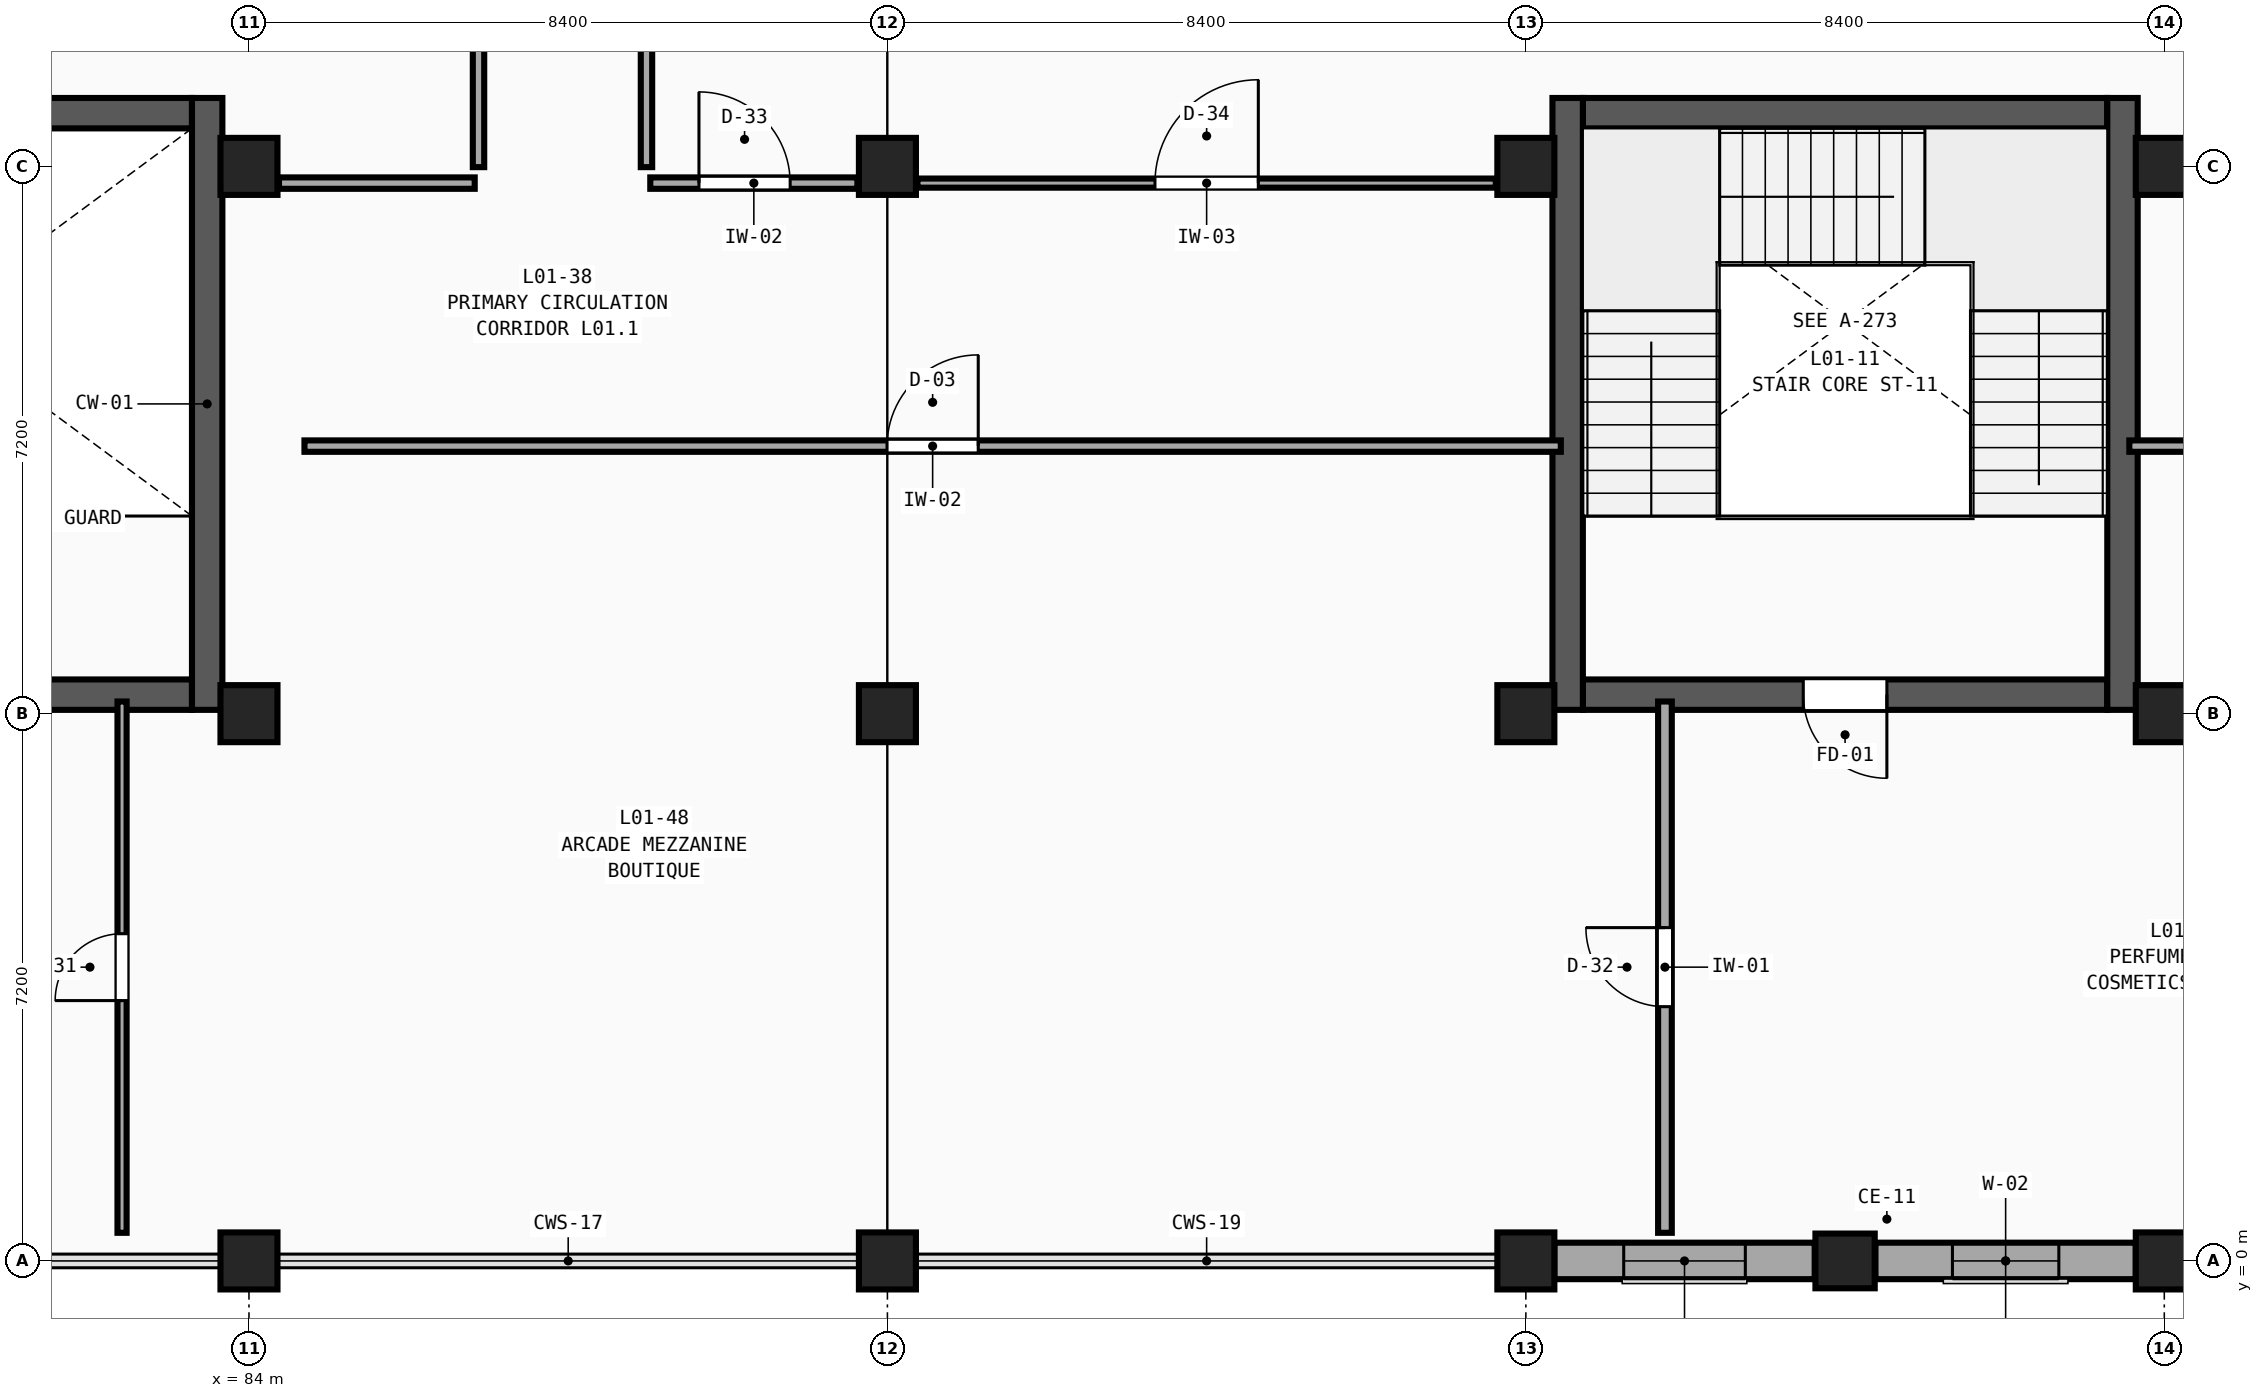
"""IFC4 building model, lengths in metres.
Left out: names, types, materials, properties, quantities, classifications, styles, units other than length and angle.
Written with IfcOpenShell. Run it as: python <this file> out.ifc"""

import sys

from ifc_helpers import new_model, si_unit, direction, frame, frame_2d, origin, origin_2d, place, context, subcontext, project, spatial, rectangle, extrude, element, fill, save


model = new_model("IFC4")
c1 = context("Model", 3, precision=1e-05, world=origin(), true_north=direction((0.0, 1.0)))
c2 = subcontext(c1, "Body", "Model", "MODEL_VIEW")
j1 = project(units=[si_unit("LENGTHUNIT", "METRE"), si_unit("PLANEANGLEUNIT", "RADIAN")], contexts=[c1])
p1 = place(None, origin())
s1 = spatial("IfcSite", under=j1, at=p1, CompositionType="ELEMENT")
p2 = place(p1, origin())
s2 = spatial("IfcBuilding", under=s1, at=p2, CompositionType="ELEMENT")
p3 = place(p2, frame((0.0, 0.0, 5.4)))
s3 = spatial("IfcBuildingStorey", under=s2, at=p3, CompositionType="ELEMENT", Elevation=5.4)
for number, where, z_axis, x_axis in (
    (1, (84.0, 0.0, 0.0), (0.0, 0.0, 1.0), (1.0, 0.0, 0.0)),
    (2, (84.0, 7.2, 0.0), (0.0, 0.0, 1.0), (1.0, 0.0, 0.0)),
    (3, (84.0, 14.4, 0.0), (0.0, 0.0, 1.0), (1.0, 0.0, 0.0)),
    (4, (92.4, 0.0, 0.0), (0.0, 0.0, 1.0), (1.0, 0.0, 0.0)),
    (5, (92.4, 7.2, 0.0), (0.0, 0.0, 1.0), (1.0, 0.0, 0.0)),
    (6, (92.4, 14.4, 0.0), (0.0, 0.0, 1.0), (1.0, 0.0, 0.0)),
    (7, (100.8, 0.0, 0.0), (0.0, 0.0, 1.0), (1.0, 0.0, 0.0)),
    (8, (100.8, 7.2, 0.0), (0.0, 0.0, 1.0), (1.0, 0.0, 0.0)),
    (9, (100.8, 14.4, 0.0), (0.0, 0.0, 1.0), (1.0, 0.0, 0.0)),
    (10, (109.2, 0.0, 0.0), (0.0, 0.0, 1.0), (1.0, 0.0, 0.0)),
    (11, (109.2, 7.2, 0.0), (0.0, 0.0, 1.0), (1.0, 0.0, 0.0)),
    (12, (109.2, 14.4, 0.0), (0.0, 0.0, 1.0), (1.0, 0.0, 0.0)),
):
    element("IfcColumn", number, at=place(p3, frame(where, z_axis=z_axis, x_axis=x_axis)), inside=s3, PredefinedType="COLUMN", context=c2, shape_type="SweptSolid", body=[
        extrude(rectangle(XDim=0.75, YDim=0.75, at=origin_2d()), origin(), (0.0, 0.0, 1.0), 4.5),
    ])
p4 = place(p3, frame((105.0, 0.0, 0.0), z_axis=(0.0, 0.0, 1.0), x_axis=(1.0, 0.0, 0.0)))
e13 = element("IfcColumn", 13, at=p4, inside=s3, PredefinedType="PILASTER", context=c2, shape_type="SweptSolid", body=[
    extrude(rectangle(XDim=0.78, YDim=0.72, at=origin_2d()), origin(), (0.0, 0.0, 1.0), 4.5),
])
p5 = place(p3, frame((108.825, 0.0, 0.0), z_axis=(0.0, 0.0, 1.0), x_axis=(-1.0, 0.0, 0.0)))
e14 = element("IfcWall", 14, at=p5, inside=s3, PredefinedType="SOLIDWALL", context=c2, shape_type="SweptSolid", body=[
    extrude(rectangle(XDim=3.425, YDim=0.48, at=frame_2d((1.712, 0.0))), origin(), (0.0, 0.0, 1.0), 3.63),
])
p6 = place(p5, frame((1.012, 0.0, 0.75)))
e15 = element("IfcOpeningElement", 15, at=p6, cuts=e14, PredefinedType="OPENING", context=c2, shape_type="SweptSolid", body=[
    extrude(rectangle(XDim=1.4, YDim=1.9, at=frame_2d((0.7, 0.95))), frame((0.0, 0.26, 0.0), z_axis=(0.0, -1.0, 0.0), x_axis=(1.0, 0.0, 0.0)), (0.0, 0.0, 1.0), 0.52),
])
p7 = place(p3, frame((104.6, 0.0, 0.0), z_axis=(0.0, 0.0, 1.0), x_axis=(-1.0, 0.0, 0.0)))
e16 = element("IfcWall", 16, at=p7, inside=s3, PredefinedType="SOLIDWALL", context=c2, shape_type="SweptSolid", body=[
    extrude(rectangle(XDim=3.425, YDim=0.48, at=frame_2d((1.712, 0.0))), origin(), (0.0, 0.0, 1.0), 3.63),
])
p8 = place(p7, frame((0.913, 0.0, 0.75)))
e17 = element("IfcOpeningElement", 17, at=p8, cuts=e16, PredefinedType="OPENING", context=c2, shape_type="SweptSolid", body=[
    extrude(rectangle(XDim=1.6, YDim=1.9, at=frame_2d((0.8, 0.95))), frame((0.0, 0.26, 0.0), z_axis=(0.0, -1.0, 0.0), x_axis=(1.0, 0.0, 0.0)), (0.0, 0.0, 1.0), 0.52),
])
p9 = place(p3, frame((83.25, 7.45, 0.0), z_axis=(0.0, 0.0, 1.0), x_axis=(-1.0, 0.0, 0.0)))
e18 = element("IfcWall", 18, at=p9, inside=s3, PredefinedType="SHEAR", context=c2, shape_type="SweptSolid", body=[
    extrude(rectangle(XDim=6.9, YDim=0.4, at=frame_2d((3.45, 0.0))), origin(), (0.0, 0.0, 1.0), 4.5),
])
p10 = place(p9, frame((2.9, 0.0, 0.0)))
e19 = element("IfcOpeningElement", 19, at=p10, cuts=e18, PredefinedType="OPENING", context=c2, shape_type="SweptSolid", body=[
    extrude(rectangle(XDim=1.1, YDim=2.2, at=frame_2d((0.55, 1.1))), frame((0.0, 0.22, 0.0), z_axis=(0.0, -1.0, 0.0), x_axis=(1.0, 0.0, 0.0)), (0.0, 0.0, 1.0), 0.44),
])
p11 = place(p3, frame((76.35, 15.1, 0.0), z_axis=(0.0, 0.0, 1.0), x_axis=(1.0, 0.0, 0.0)))
e20 = element("IfcWall", 20, at=p11, inside=s3, PredefinedType="SHEAR", context=c2, shape_type="SweptSolid", body=[
    extrude(rectangle(XDim=6.9, YDim=0.4, at=frame_2d((3.45, 0.0))), origin(), (0.0, 0.0, 1.0), 4.5),
])
p12 = place(p3, frame((83.45, 7.25, 0.0), z_axis=(0.0, 0.0, 1.0), x_axis=(0.0, 1.0, 0.0)))
e21 = element("IfcWall", 21, at=p12, inside=s3, PredefinedType="SHEAR", context=c2, shape_type="SweptSolid", body=[
    extrude(rectangle(XDim=8.05, YDim=0.4, at=frame_2d((4.025, 0.0))), origin(), (0.0, 0.0, 1.0), 4.5),
])
p13 = place(p3, frame((108.45, 7.45, 0.0), z_axis=(0.0, 0.0, 1.0), x_axis=(-1.0, 0.0, 0.0)))
e22 = element("IfcWall", 22, at=p13, inside=s3, PredefinedType="SHEAR", context=c2, shape_type="SweptSolid", body=[
    extrude(rectangle(XDim=6.9, YDim=0.4, at=frame_2d((3.45, 0.0))), origin(), (0.0, 0.0, 1.0), 4.5),
])
p14 = place(p13, frame((2.9, 0.0, 0.0)))
e23 = element("IfcOpeningElement", 23, at=p14, cuts=e22, PredefinedType="OPENING", context=c2, shape_type="SweptSolid", body=[
    extrude(rectangle(XDim=1.1, YDim=2.2, at=frame_2d((0.55, 1.1))), frame((0.0, 0.22, 0.0), z_axis=(0.0, -1.0, 0.0), x_axis=(1.0, 0.0, 0.0)), (0.0, 0.0, 1.0), 0.44),
])
p15 = place(p3, frame((101.55, 15.1, 0.0), z_axis=(0.0, 0.0, 1.0), x_axis=(1.0, 0.0, 0.0)))
e24 = element("IfcWall", 24, at=p15, inside=s3, PredefinedType="SHEAR", context=c2, shape_type="SweptSolid", body=[
    extrude(rectangle(XDim=6.9, YDim=0.4, at=frame_2d((3.45, 0.0))), origin(), (0.0, 0.0, 1.0), 4.5),
])
for number, where, z_axis, x_axis in (
    (25, (101.35, 15.3, 0.0), (0.0, 0.0, 1.0), (0.0, -1.0, 0.0)),
    (26, (108.65, 7.25, 0.0), (0.0, 0.0, 1.0), (0.0, 1.0, 0.0)),
):
    element("IfcWall", number, at=place(p3, frame(where, z_axis=z_axis, x_axis=x_axis)), inside=s3, PredefinedType="SHEAR", context=c2, shape_type="SweptSolid", body=[
        extrude(rectangle(XDim=8.05, YDim=0.4, at=frame_2d((4.025, 0.0))), origin(), (0.0, 0.0, 1.0), 4.5),
    ])
p16 = place(p3, frame((108.74, 10.72, 0.0), z_axis=(0.0, 0.0, 1.0), x_axis=(1.0, 0.0, 0.0)))
e27 = element("IfcWall", 27, at=p16, inside=s3, PredefinedType="PARTITIONING", context=c2, shape_type="SweptSolid", body=[
    extrude(rectangle(XDim=17.52, YDim=0.15, at=frame_2d((8.76, 0.0))), origin(), (0.0, 0.0, 1.0), 4.18),
])
p17 = place(p16, frame((8.16, 0.0, 0.0)))
e28 = element("IfcOpeningElement", 28, at=p17, cuts=e27, PredefinedType="OPENING", context=c2, shape_type="SweptSolid", body=[
    extrude(rectangle(XDim=1.2, YDim=2.45, at=frame_2d((0.6, 1.225))), frame((0.0, 0.095, 0.0), z_axis=(0.0, -1.0, 0.0), x_axis=(1.0, 0.0, 0.0)), (0.0, 0.0, 1.0), 0.19),
])
p18 = place(p3, frame((84.73, 10.72, 0.0), z_axis=(0.0, 0.0, 1.0), x_axis=(1.0, 0.0, 0.0)))
e29 = element("IfcWall", 29, at=p18, inside=s3, PredefinedType="PARTITIONING", context=c2, shape_type="SweptSolid", body=[
    extrude(rectangle(XDim=16.53, YDim=0.15, at=frame_2d((8.265, 0.0))), origin(), (0.0, 0.0, 1.0), 4.18),
])
p19 = place(p18, frame((7.665, 0.0, 0.0)))
e30 = element("IfcOpeningElement", 30, at=p19, cuts=e29, PredefinedType="OPENING", context=c2, shape_type="SweptSolid", body=[
    extrude(rectangle(XDim=1.2, YDim=2.05, at=frame_2d((0.6, 1.025))), frame((0.0, 0.095, 0.0), z_axis=(0.0, -1.0, 0.0), x_axis=(1.0, 0.0, 0.0)), (0.0, 0.0, 1.0), 0.19),
])
p20 = place(p3, frame((89.28, 14.18, 0.0), z_axis=(0.0, 0.0, 1.0), x_axis=(1.0, 0.0, 0.0)))
e31 = element("IfcWall", 31, at=p20, inside=s3, PredefinedType="PARTITIONING", context=c2, shape_type="SweptSolid", body=[
    extrude(rectangle(XDim=2.725, YDim=0.15, at=frame_2d((1.362, 0.0))), origin(), (0.0, 0.0, 1.0), 3.73),
])
p21 = place(p20, frame((0.64, 0.0, 0.0)))
e32 = element("IfcOpeningElement", 32, at=p21, cuts=e31, PredefinedType="OPENING", context=c2, shape_type="SweptSolid", body=[
    extrude(rectangle(XDim=1.2, YDim=2.45, at=frame_2d((0.6, 1.225))), frame((0.0, 0.095, 0.0), z_axis=(0.0, -1.0, 0.0), x_axis=(1.0, 0.0, 0.0)), (0.0, 0.0, 1.0), 0.19),
])
p22 = place(p3, frame((92.795, 14.18, 0.0), z_axis=(0.0, 0.0, 1.0), x_axis=(1.0, 0.0, 0.0)))
e33 = element("IfcWall", 33, at=p22, inside=s3, PredefinedType="PARTITIONING", context=c2, shape_type="SweptSolid", body=[
    extrude(rectangle(XDim=7.61, YDim=0.12, at=frame_2d((3.805, 0.0))), origin(), (0.0, 0.0, 1.0), 3.73),
])
p23 = place(p22, frame((3.125, 0.0, 0.0)))
e34 = element("IfcOpeningElement", 34, at=p23, cuts=e33, PredefinedType="OPENING", context=c2, shape_type="SweptSolid", body=[
    extrude(rectangle(XDim=1.36, YDim=2.45, at=frame_2d((0.68, 1.225))), frame((0.0, 0.08, 0.0), z_axis=(0.0, -1.0, 0.0), x_axis=(1.0, 0.0, 0.0)), (0.0, 0.0, 1.0), 0.16),
])
p24 = place(p3, frame((87.02, 14.39, 0.0), z_axis=(0.0, 0.0, 1.0), x_axis=(0.0, 1.0, 0.0)))
e35 = element("IfcWall", 35, at=p24, inside=s3, PredefinedType="PARTITIONING", context=c2, shape_type="SweptSolid", body=[
    extrude(rectangle(XDim=10.47, YDim=0.15, at=frame_2d((5.235, 0.0))), origin(), (0.0, 0.0, 1.0), 4.18),
])
p25 = place(p24, frame((4.635, 0.0, 0.0)))
e36 = element("IfcOpeningElement", 36, at=p25, cuts=e35, PredefinedType="OPENING", context=c2, shape_type="SweptSolid", body=[
    extrude(rectangle(XDim=1.2, YDim=2.21, at=frame_2d((0.6, 1.105))), frame((0.0, 0.095, 0.0), z_axis=(0.0, -1.0, 0.0), x_axis=(1.0, 0.0, 0.0)), (0.0, 0.0, 1.0), 0.19),
])
p26 = place(p3, frame((89.23, 14.39, 0.0), z_axis=(0.0, 0.0, 1.0), x_axis=(0.0, 1.0, 0.0)))
e37 = element("IfcWall", 37, at=p26, inside=s3, PredefinedType="PARTITIONING", context=c2, shape_type="SweptSolid", body=[
    extrude(rectangle(XDim=10.47, YDim=0.15, at=frame_2d((5.235, 0.0))), origin(), (0.0, 0.0, 1.0), 4.18),
])
p27 = place(p26, frame((4.395, 0.0, 0.0)))
e38 = element("IfcOpeningElement", 38, at=p27, cuts=e37, PredefinedType="OPENING", context=c2, shape_type="SweptSolid", body=[
    extrude(rectangle(XDim=1.68, YDim=2.21, at=frame_2d((0.84, 1.105))), frame((0.0, 0.095, 0.0), z_axis=(0.0, -1.0, 0.0), x_axis=(1.0, 0.0, 0.0)), (0.0, 0.0, 1.0), 0.19),
])
p28 = place(p3, frame((82.33, 0.37, 0.0), z_axis=(0.0, 0.0, 1.0), x_axis=(0.0, 1.0, 0.0)))
e39 = element("IfcWall", 39, at=p28, inside=s3, PredefinedType="PARTITIONING", context=c2, shape_type="SweptSolid", body=[
    extrude(rectangle(XDim=6.99, YDim=0.12, at=frame_2d((3.495, 0.0))), origin(), (0.0, 0.0, 1.0), 4.18),
])
p29 = place(p28, frame((3.055, 0.0, 0.0)))
e40 = element("IfcOpeningElement", 40, at=p29, cuts=e39, PredefinedType="OPENING", context=c2, shape_type="SweptSolid", body=[
    extrude(rectangle(XDim=0.88, YDim=2.45, at=frame_2d((0.44, 1.225))), frame((0.0, 0.08, 0.0), z_axis=(0.0, -1.0, 0.0), x_axis=(1.0, 0.0, 0.0)), (0.0, 0.0, 1.0), 0.16),
])
p30 = place(p3, frame((102.63, 0.37, 0.0), z_axis=(0.0, 0.0, 1.0), x_axis=(0.0, 1.0, 0.0)))
e41 = element("IfcWall", 41, at=p30, inside=s3, PredefinedType="PARTITIONING", context=c2, shape_type="SweptSolid", body=[
    extrude(rectangle(XDim=6.99, YDim=0.18, at=frame_2d((3.495, 0.0))), origin(), (0.0, 0.0, 1.0), 4.18),
])
p31 = place(p30, frame((2.975, 0.0, 0.0)))
e42 = element("IfcOpeningElement", 42, at=p31, cuts=e41, PredefinedType="OPENING", context=c2, shape_type="SweptSolid", body=[
    extrude(rectangle(XDim=1.04, YDim=2.45, at=frame_2d((0.52, 1.225))), frame((0.0, 0.11, 0.0), z_axis=(0.0, -1.0, 0.0), x_axis=(1.0, 0.0, 0.0)), (0.0, 0.0, 1.0), 0.22),
])
p32 = place(p3, frame((84.395, 14.18, 0.0), z_axis=(0.0, 0.0, 1.0), x_axis=(1.0, 0.0, 0.0)))
e43 = element("IfcWall", 43, at=p32, inside=s3, PredefinedType="PARTITIONING", context=c2, shape_type="SweptSolid", body=[
    extrude(rectangle(XDim=2.575, YDim=0.15, at=frame_2d((1.288, 0.0))), origin(), (0.0, 0.0, 1.0), 3.73),
])
p33 = place(p6, origin())
e44 = element("IfcWindow", 44, at=p33, inside=s3, PartitioningType="DOUBLE_PANEL_VERTICAL", PredefinedType="WINDOW", context=c2, shape_type="SweptSolid", body=[
    extrude(rectangle(XDim=1.4, YDim=1.9, at=frame_2d((0.7, 0.95))), frame((0.0, 0.03, 0.0), z_axis=(0.0, -1.0, 0.0), x_axis=(1.0, 0.0, 0.0)), (0.0, 0.0, 1.0), 0.06),
])
fill(e15, e44)
p34 = place(p8, origin())
e45 = element("IfcWindow", 45, at=p34, inside=s3, PartitioningType="DOUBLE_PANEL_VERTICAL", PredefinedType="WINDOW", context=c2, shape_type="SweptSolid", body=[
    extrude(rectangle(XDim=1.6, YDim=1.9, at=frame_2d((0.8, 0.95))), frame((0.0, 0.03, 0.0), z_axis=(0.0, -1.0, 0.0), x_axis=(1.0, 0.0, 0.0)), (0.0, 0.0, 1.0), 0.06),
])
fill(e17, e45)
p35 = place(p14, origin())
e46 = element("IfcDoor", 46, at=p35, inside=s3, OperationType="SINGLE_SWING_LEFT", PredefinedType="DOOR", context=c2, shape_type="SweptSolid", body=[
    extrude(rectangle(XDim=1.1, YDim=2.2, at=frame_2d((0.55, 1.1))), frame((0.0, 0.025, 0.0), z_axis=(0.0, -1.0, 0.0), x_axis=(1.0, 0.0, 0.0)), (0.0, 0.0, 1.0), 0.05),
])
fill(e23, e46)
p36 = place(p19, origin())
e47 = element("IfcDoor", 47, at=p36, inside=s3, OperationType="SINGLE_SWING_RIGHT", PredefinedType="DOOR", context=c2, shape_type="SweptSolid", body=[
    extrude(rectangle(XDim=1.2, YDim=2.05, at=frame_2d((0.6, 1.025))), frame((0.0, 0.025, 0.0), z_axis=(0.0, -1.0, 0.0), x_axis=(1.0, 0.0, 0.0)), (0.0, 0.0, 1.0), 0.05),
])
fill(e30, e47)
p37 = place(p21, origin())
e48 = element("IfcDoor", 48, at=p37, inside=s3, OperationType="SINGLE_SWING_LEFT", PredefinedType="DOOR", context=c2, shape_type="SweptSolid", body=[
    extrude(rectangle(XDim=1.2, YDim=2.45, at=frame_2d((0.6, 1.225))), frame((0.0, 0.025, 0.0), z_axis=(0.0, -1.0, 0.0), x_axis=(1.0, 0.0, 0.0)), (0.0, 0.0, 1.0), 0.05),
])
fill(e32, e48)
p38 = place(p23, origin())
e49 = element("IfcDoor", 49, at=p38, inside=s3, OperationType="SINGLE_SWING_RIGHT", PredefinedType="DOOR", context=c2, shape_type="SweptSolid", body=[
    extrude(rectangle(XDim=1.36, YDim=2.45, at=frame_2d((0.68, 1.225))), frame((0.0, 0.025, 0.0), z_axis=(0.0, -1.0, 0.0), x_axis=(1.0, 0.0, 0.0)), (0.0, 0.0, 1.0), 0.05),
])
fill(e34, e49)
p39 = place(p29, origin())
e50 = element("IfcDoor", 50, at=p39, inside=s3, OperationType="SINGLE_SWING_LEFT", PredefinedType="DOOR", context=c2, shape_type="SweptSolid", body=[
    extrude(rectangle(XDim=0.88, YDim=2.45, at=frame_2d((0.44, 1.225))), frame((0.0, 0.025, 0.0), z_axis=(0.0, -1.0, 0.0), x_axis=(1.0, 0.0, 0.0)), (0.0, 0.0, 1.0), 0.05),
])
fill(e40, e50)
p40 = place(p31, origin())
e51 = element("IfcDoor", 51, at=p40, inside=s3, OperationType="SINGLE_SWING_RIGHT", PredefinedType="DOOR", context=c2, shape_type="SweptSolid", body=[
    extrude(rectangle(XDim=1.04, YDim=2.45, at=frame_2d((0.52, 1.225))), frame((0.0, 0.025, 0.0), z_axis=(0.0, -1.0, 0.0), x_axis=(1.0, 0.0, 0.0)), (0.0, 0.0, 1.0), 0.05),
])
fill(e42, e51)
save(model, sys.argv[1])
